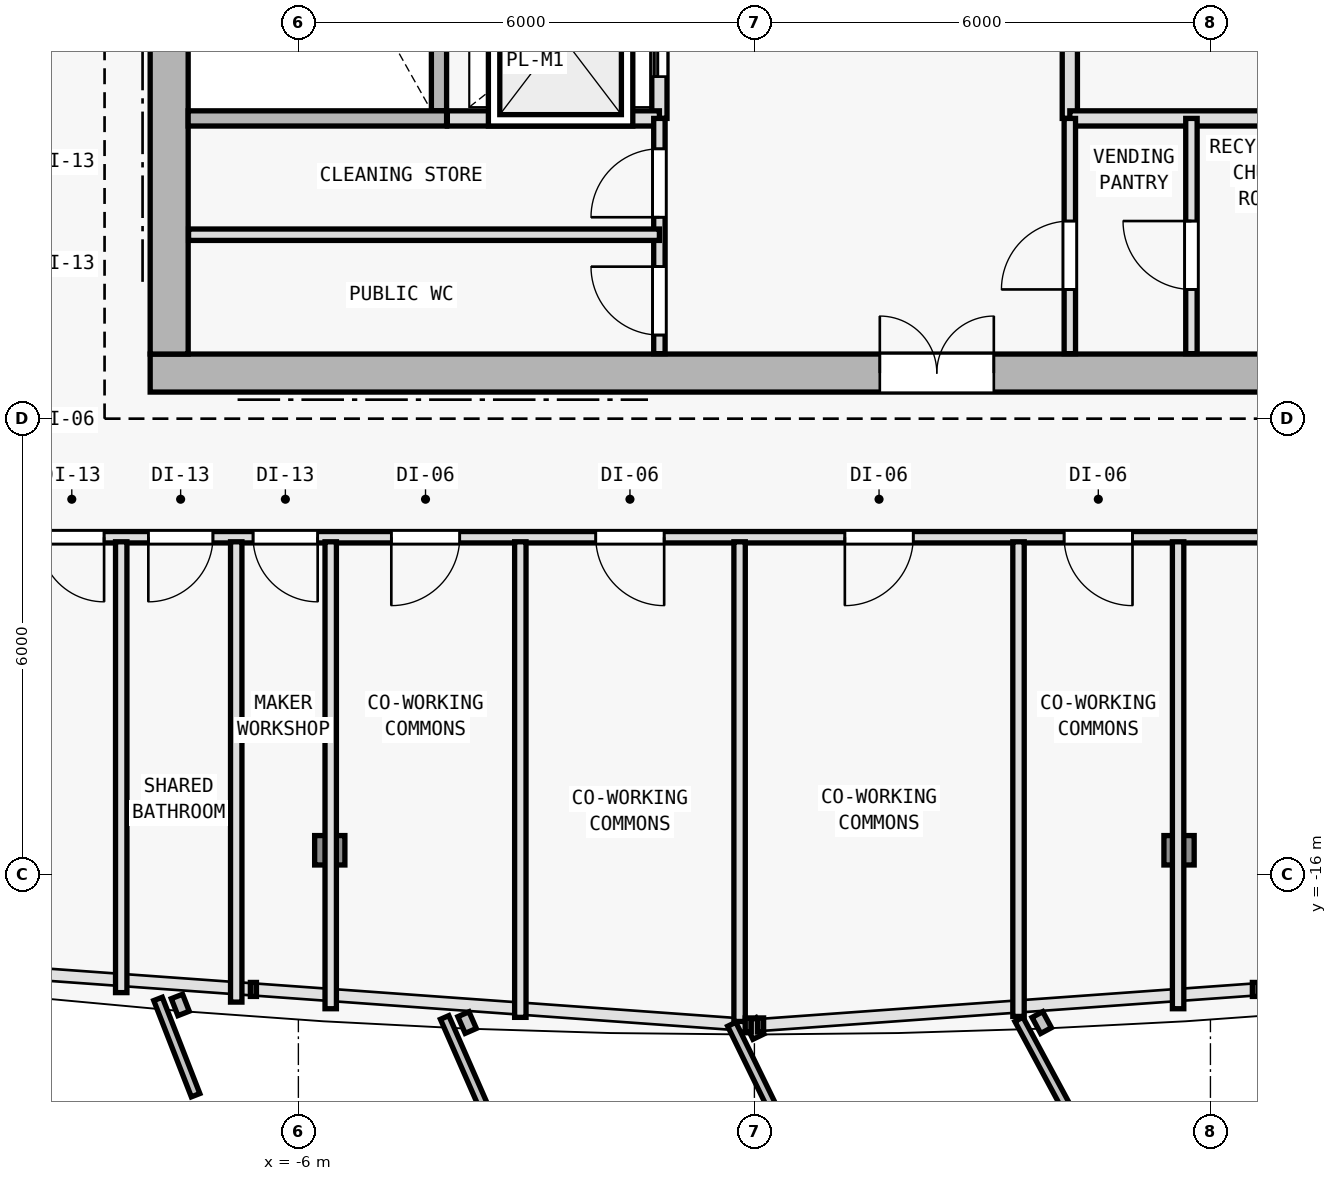
"""IFC4 building model, lengths in metres.
Left out: names, types, materials, properties, quantities, classifications, styles, units other than length and angle.
Written with IfcOpenShell. Run it as: python <this file> out.ifc"""

import sys

from ifc_helpers import new_model, si_unit, direction, frame, frame_2d, origin, origin_2d, place, context, subcontext, project, spatial, rectangle, i_section, extrude, element, fill, save


model = new_model("IFC4")
c1 = context("Model", 3, precision=1e-05, world=origin(), true_north=direction((0.0, 1.0)))
c2 = subcontext(c1, "Body", "Model", "MODEL_VIEW")
j1 = project(units=[si_unit("LENGTHUNIT", "METRE"), si_unit("PLANEANGLEUNIT", "RADIAN")], contexts=[c1])
p1 = place(None, origin())
s1 = spatial("IfcSite", under=j1, at=p1, CompositionType="ELEMENT")
p2 = place(p1, origin())
s2 = spatial("IfcBuilding", under=s1, at=p2, CompositionType="ELEMENT")
p3 = place(p2, frame((0.0, 0.0, 212.7)))
s3 = spatial("IfcBuildingStorey", under=s2, at=p3, CompositionType="ELEMENT", Elevation=212.7)
for number, where, z_axis, x_axis in (
    (1, (-7.7, -9.4, 0.0), (0.0, 0.0, 1.0), (1.0, 0.0, 0.0)),
    (2, (0.0, -9.4, 0.0), (0.0, 0.0, 1.0), (1.0, 0.0, 0.0)),
):
    element("IfcColumn", number, at=place(p3, frame(where, z_axis=z_axis, x_axis=x_axis)), inside=s3, PredefinedType="COLUMN", context=c2, shape_type="SweptSolid", body=[
        extrude(i_section(OverallWidth=0.398, OverallDepth=0.387, WebThickness=0.013, FlangeThickness=0.022, FilletRadius=0.015, at=origin_2d()), origin(), (0.0, 0.0, 1.0), 3.6),
    ])
for number, where, z_axis, x_axis in (
    (3, (-5.587, -15.678, 0.006), (0.007, 0.035, 0.999), (-0.982, 0.191, 0.0)),
    (4, (5.587, -15.678, 0.006), (-0.007, 0.035, 0.999), (-0.982, -0.191, 0.0)),
):
    element("IfcColumn", number, at=place(p3, frame(where, z_axis=z_axis, x_axis=x_axis)), inside=s3, PredefinedType="COLUMN", context=c2, shape_type="SweptSolid", body=[
        extrude(i_section(OverallWidth=0.398, OverallDepth=0.387, WebThickness=0.013, FlangeThickness=0.022, FilletRadius=0.015, at=origin_2d()), origin(), (0.0, 0.0, 1.0), 3.591),
    ])
p4 = place(p3, frame((-7.95, -9.4, 0.0), z_axis=(0.0, 0.0, 1.0), x_axis=(1.0, 0.0, 0.0)))
e5 = element("IfcWall", 5, at=p4, inside=s3, PredefinedType="SHEAR", context=c2, shape_type="SweptSolid", body=[
    extrude(rectangle(XDim=15.9, YDim=0.5, at=frame_2d((7.95, 0.0))), origin(), (0.0, 0.0, 1.0), 3.35),
])
p5 = place(p4, frame((9.6, 0.0, 0.0)))
e6 = element("IfcOpeningElement", 6, at=p5, cuts=e5, PredefinedType="OPENING", context=c2, shape_type="SweptSolid", body=[
    extrude(rectangle(XDim=1.5, YDim=2.2, at=frame_2d((0.75, 1.1))), frame((0.0, 0.26, 0.0), z_axis=(0.0, -1.0, 0.0), x_axis=(1.0, 0.0, 0.0)), (0.0, 0.0, 1.0), 0.52),
])
p6 = place(p3, frame((-7.7, -9.15, 0.0), z_axis=(0.0, 0.0, 1.0), x_axis=(0.0, 1.0, 0.0)))
e7 = element("IfcWall", 7, at=p6, inside=s3, PredefinedType="SHEAR", context=c2, shape_type="SweptSolid", body=[
    extrude(rectangle(XDim=19.1, YDim=0.5, at=frame_2d((9.55, 0.0))), origin(), (0.0, 0.0, 1.0), 3.35),
])
p7 = place(p6, frame((12.7, 0.0, 0.0)))
e8 = element("IfcOpeningElement", 8, at=p7, cuts=e7, PredefinedType="OPENING", context=c2, shape_type="SweptSolid", body=[
    extrude(rectangle(XDim=1.1, YDim=2.15, at=frame_2d((0.55, 1.075))), frame((0.0, 0.26, 0.0), z_axis=(0.0, -1.0, 0.0), x_axis=(1.0, 0.0, 0.0)), (0.0, 0.0, 1.0), 0.52),
])
p8 = place(p3, frame((-4.15, -5.95, 0.0), z_axis=(0.0, 0.0, 1.0), x_axis=(0.0, 1.0, 0.0)))
e9 = element("IfcWall", 9, at=p8, inside=s3, PredefinedType="SOLIDWALL", context=c2, shape_type="SweptSolid", body=[
    extrude(rectangle(XDim=7.2, YDim=0.2, at=frame_2d((3.6, 0.0))), origin(), (0.0, 0.0, 1.0), 3.35),
])
p9 = place(p3, frame((4.15, -6.05, 0.0), z_axis=(0.0, 0.0, 1.0), x_axis=(0.0, 1.0, 0.0)))
e10 = element("IfcWall", 10, at=p9, inside=s3, PredefinedType="SOLIDWALL", context=c2, shape_type="SweptSolid", body=[
    extrude(rectangle(XDim=8.7, YDim=0.2, at=frame_2d((4.35, 0.0))), origin(), (0.0, 0.0, 1.0), 3.35),
])
p10 = place(p9, frame((3.6, 0.0, 0.0)))
e11 = element("IfcOpeningElement", 11, at=p10, cuts=e10, PredefinedType="OPENING", context=c2, shape_type="SweptSolid", body=[
    extrude(rectangle(XDim=0.95, YDim=2.1, at=frame_2d((0.475, 1.05))), frame((0.0, 0.11, 0.0), z_axis=(0.0, -1.0, 0.0), x_axis=(1.0, 0.0, 0.0)), (0.0, 0.0, 1.0), 0.22),
])
p11 = place(p3, frame((-1.25, -6.05, 0.0), z_axis=(0.0, 0.0, 1.0), x_axis=(0.0, 1.0, 0.0)))
e12 = element("IfcWall", 12, at=p11, inside=s3, PredefinedType="SOLIDWALL", context=c2, shape_type="SweptSolid", body=[
    extrude(rectangle(XDim=8.7, YDim=0.2, at=frame_2d((4.35, 0.0))), origin(), (0.0, 0.0, 1.0), 3.35),
])
p12 = place(p11, frame((0.55, 0.0, 0.0)))
e13 = element("IfcOpeningElement", 13, at=p12, cuts=e12, PredefinedType="OPENING", context=c2, shape_type="SweptSolid", body=[
    extrude(rectangle(XDim=1.1, YDim=2.15, at=frame_2d((0.55, 1.075))), frame((0.0, 0.11, 0.0), z_axis=(0.0, -1.0, 0.0), x_axis=(1.0, 0.0, 0.0)), (0.0, 0.0, 1.0), 0.22),
])
p13 = place(p11, frame((2.65, 0.0, 0.0)))
e14 = element("IfcOpeningElement", 14, at=p13, cuts=e12, PredefinedType="OPENING", context=c2, shape_type="SweptSolid", body=[
    extrude(rectangle(XDim=1.1, YDim=2.15, at=frame_2d((0.55, 1.075))), frame((0.0, 0.11, 0.0), z_axis=(0.0, -1.0, 0.0), x_axis=(1.0, 0.0, 0.0)), (0.0, 0.0, 1.0), 0.22),
])
p14 = place(p11, frame((4.75, 0.0, 0.0)))
e15 = element("IfcOpeningElement", 15, at=p14, cuts=e12, PredefinedType="OPENING", context=c2, shape_type="SweptSolid", body=[
    extrude(rectangle(XDim=1.1, YDim=2.15, at=frame_2d((0.55, 1.075))), frame((0.0, 0.11, 0.0), z_axis=(0.0, -1.0, 0.0), x_axis=(1.0, 0.0, 0.0)), (0.0, 0.0, 1.0), 0.22),
])
p15 = place(p11, frame((6.85, 0.0, 0.0)))
e16 = element("IfcOpeningElement", 16, at=p15, cuts=e12, PredefinedType="OPENING", context=c2, shape_type="SweptSolid", body=[
    extrude(rectangle(XDim=1.1, YDim=2.15, at=frame_2d((0.55, 1.075))), frame((0.0, 0.11, 0.0), z_axis=(0.0, -1.0, 0.0), x_axis=(1.0, 0.0, 0.0)), (0.0, 0.0, 1.0), 0.22),
])
p16 = place(p3, frame((-7.45, -6.05, 0.0), z_axis=(0.0, 0.0, 1.0), x_axis=(1.0, 0.0, 0.0)))
e17 = element("IfcWall", 17, at=p16, inside=s3, PredefinedType="SOLIDWALL", context=c2, shape_type="SweptSolid", body=[
    extrude(rectangle(XDim=3.4, YDim=0.2, at=frame_2d((1.7, 0.0))), origin(), (0.0, 0.0, 1.0), 3.35),
])
p17 = place(p3, frame((-4.04, -6.05, 0.0), z_axis=(0.0, 0.0, 1.0), x_axis=(1.0, 0.0, 0.0)))
e18 = element("IfcWall", 18, at=p17, inside=s3, PredefinedType="SOLIDWALL", context=c2, shape_type="SweptSolid", body=[
    extrude(rectangle(XDim=2.79, YDim=0.2, at=frame_2d((1.395, 0.0))), origin(), (0.0, 0.0, 1.0), 3.35),
])
p18 = place(p3, frame((4.15, -6.05, 0.0), z_axis=(0.0, 0.0, 1.0), x_axis=(1.0, 0.0, 0.0)))
e19 = element("IfcWall", 19, at=p18, inside=s3, PredefinedType="SOLIDWALL", context=c2, shape_type="SweptSolid", body=[
    extrude(rectangle(XDim=3.295, YDim=0.2, at=frame_2d((1.647, 0.0))), origin(), (0.0, 0.0, 1.0), 3.35),
])
p19 = place(p3, frame((-1.25, -9.145, 0.0), z_axis=(0.0, 0.0, 1.0), x_axis=(0.0, 1.0, 0.0)))
e20 = element("IfcWall", 20, at=p19, inside=s3, PredefinedType="PARTITIONING", context=c2, shape_type="SweptSolid", body=[
    extrude(rectangle(XDim=3.095, YDim=0.15, at=frame_2d((1.547, 0.0))), origin(), (0.0, 0.0, 1.0), 3.35),
])
p20 = place(p19, frame((1.795, 0.0, 0.0)))
e21 = element("IfcOpeningElement", 21, at=p20, cuts=e20, PredefinedType="OPENING", context=c2, shape_type="SweptSolid", body=[
    extrude(rectangle(XDim=0.9, YDim=2.1, at=frame_2d((0.45, 1.05))), frame((0.0, 0.085, 0.0), z_axis=(0.0, -1.0, 0.0), x_axis=(1.0, 0.0, 0.0)), (0.0, 0.0, 1.0), 0.17),
])
p21 = place(p19, frame((0.245, 0.0, 0.0)))
e22 = element("IfcOpeningElement", 22, at=p21, cuts=e20, PredefinedType="OPENING", context=c2, shape_type="SweptSolid", body=[
    extrude(rectangle(XDim=0.9, YDim=2.1, at=frame_2d((0.45, 1.05))), frame((0.0, 0.085, 0.0), z_axis=(0.0, -1.0, 0.0), x_axis=(1.0, 0.0, 0.0)), (0.0, 0.0, 1.0), 0.17),
])
p22 = place(p3, frame((4.15, -9.145, 0.0), z_axis=(0.0, 0.0, 1.0), x_axis=(0.0, 1.0, 0.0)))
e23 = element("IfcWall", 23, at=p22, inside=s3, PredefinedType="PARTITIONING", context=c2, shape_type="SweptSolid", body=[
    extrude(rectangle(XDim=3.095, YDim=0.15, at=frame_2d((1.547, 0.0))), origin(), (0.0, 0.0, 1.0), 3.35),
])
p23 = place(p22, frame((0.845, 0.0, 0.0)))
e24 = element("IfcOpeningElement", 24, at=p23, cuts=e23, PredefinedType="OPENING", context=c2, shape_type="SweptSolid", body=[
    extrude(rectangle(XDim=0.9, YDim=2.1, at=frame_2d((0.45, 1.05))), frame((0.0, 0.085, 0.0), z_axis=(0.0, -1.0, 0.0), x_axis=(1.0, 0.0, 0.0)), (0.0, 0.0, 1.0), 0.17),
])
p24 = place(p3, frame((-7.445, -7.58, 0.0), z_axis=(0.0, 0.0, 1.0), x_axis=(1.0, 0.0, 0.0)))
e25 = element("IfcWall", 25, at=p24, inside=s3, PredefinedType="PARTITIONING", context=c2, shape_type="SweptSolid", body=[
    extrude(rectangle(XDim=6.195, YDim=0.15, at=frame_2d((3.098, 0.0))), origin(), (0.0, 0.0, 1.0), 3.35),
])
p25 = place(p3, frame((5.75, -9.145, 0.0), z_axis=(0.0, 0.0, 1.0), x_axis=(0.0, 1.0, 0.0)))
e26 = element("IfcWall", 26, at=p25, inside=s3, PredefinedType="PARTITIONING", context=c2, shape_type="SweptSolid", body=[
    extrude(rectangle(XDim=3.095, YDim=0.15, at=frame_2d((1.547, 0.0))), origin(), (0.0, 0.0, 1.0), 3.35),
])
p26 = place(p25, frame((0.845, 0.0, 0.0)))
e27 = element("IfcOpeningElement", 27, at=p26, cuts=e26, PredefinedType="OPENING", context=c2, shape_type="SweptSolid", body=[
    extrude(rectangle(XDim=0.9, YDim=2.1, at=frame_2d((0.45, 1.05))), frame((0.0, 0.085, 0.0), z_axis=(0.0, -1.0, 0.0), x_axis=(1.0, 0.0, 0.0)), (0.0, 0.0, 1.0), 0.17),
])
p27 = place(p3, frame((13.18, -11.56, 0.0), z_axis=(0.0, 0.0, 1.0), x_axis=(-1.0, 0.0, 0.0)))
e28 = element("IfcWall", 28, at=p27, inside=s3, PredefinedType="PARTITIONING", context=c2, shape_type="SweptSolid", body=[
    extrude(rectangle(XDim=23.04, YDim=0.15, at=frame_2d((11.52, 0.0))), origin(), (0.0, 0.0, 1.0), 2.825),
])
p28 = place(p27, frame((21.736, 0.0, 0.0)))
e29 = element("IfcOpeningElement", 29, at=p28, cuts=e28, PredefinedType="OPENING", context=c2, shape_type="SweptSolid", body=[
    extrude(rectangle(XDim=0.85, YDim=2.1, at=frame_2d((0.425, 1.05))), frame((0.0, 0.085, 0.0), z_axis=(0.0, -1.0, 0.0), x_axis=(1.0, 0.0, 0.0)), (0.0, 0.0, 1.0), 0.17),
])
p29 = place(p27, frame((20.304, 0.0, 0.0)))
e30 = element("IfcOpeningElement", 30, at=p29, cuts=e28, PredefinedType="OPENING", context=c2, shape_type="SweptSolid", body=[
    extrude(rectangle(XDim=0.85, YDim=2.1, at=frame_2d((0.425, 1.05))), frame((0.0, 0.085, 0.0), z_axis=(0.0, -1.0, 0.0), x_axis=(1.0, 0.0, 0.0)), (0.0, 0.0, 1.0), 0.17),
])
p30 = place(p27, frame((18.926, 0.0, 0.0)))
e31 = element("IfcOpeningElement", 31, at=p30, cuts=e28, PredefinedType="OPENING", context=c2, shape_type="SweptSolid", body=[
    extrude(rectangle(XDim=0.85, YDim=2.1, at=frame_2d((0.425, 1.05))), frame((0.0, 0.085, 0.0), z_axis=(0.0, -1.0, 0.0), x_axis=(1.0, 0.0, 0.0)), (0.0, 0.0, 1.0), 0.17),
])
p31 = place(p27, frame((17.057, 0.0, 0.0)))
e32 = element("IfcOpeningElement", 32, at=p31, cuts=e28, PredefinedType="OPENING", context=c2, shape_type="SweptSolid", body=[
    extrude(rectangle(XDim=0.9, YDim=2.1, at=frame_2d((0.45, 1.05))), frame((0.0, 0.085, 0.0), z_axis=(0.0, -1.0, 0.0), x_axis=(1.0, 0.0, 0.0)), (0.0, 0.0, 1.0), 0.17),
])
p32 = place(p27, frame((14.367, 0.0, 0.0)))
e33 = element("IfcOpeningElement", 33, at=p32, cuts=e28, PredefinedType="OPENING", context=c2, shape_type="SweptSolid", body=[
    extrude(rectangle(XDim=0.9, YDim=2.1, at=frame_2d((0.45, 1.05))), frame((0.0, 0.085, 0.0), z_axis=(0.0, -1.0, 0.0), x_axis=(1.0, 0.0, 0.0)), (0.0, 0.0, 1.0), 0.17),
])
p33 = place(p27, frame((11.09, 0.0, 0.0)))
e34 = element("IfcOpeningElement", 34, at=p33, cuts=e28, PredefinedType="OPENING", context=c2, shape_type="SweptSolid", body=[
    extrude(rectangle(XDim=0.9, YDim=2.1, at=frame_2d((0.45, 1.05))), frame((0.0, 0.085, 0.0), z_axis=(0.0, -1.0, 0.0), x_axis=(1.0, 0.0, 0.0)), (0.0, 0.0, 1.0), 0.17),
])
p34 = place(p27, frame((8.205, 0.0, 0.0)))
e35 = element("IfcOpeningElement", 35, at=p34, cuts=e28, PredefinedType="OPENING", context=c2, shape_type="SweptSolid", body=[
    extrude(rectangle(XDim=0.9, YDim=2.1, at=frame_2d((0.45, 1.05))), frame((0.0, 0.085, 0.0), z_axis=(0.0, -1.0, 0.0), x_axis=(1.0, 0.0, 0.0)), (0.0, 0.0, 1.0), 0.17),
])
p35 = place(p27, frame((3.442, 0.0, 0.0)))
e36 = element("IfcOpeningElement", 36, at=p35, cuts=e28, PredefinedType="OPENING", context=c2, shape_type="SweptSolid", body=[
    extrude(rectangle(XDim=0.9, YDim=2.1, at=frame_2d((0.45, 1.05))), frame((0.0, 0.085, 0.0), z_axis=(0.0, -1.0, 0.0), x_axis=(1.0, 0.0, 0.0)), (0.0, 0.0, 1.0), 0.17),
])
p36 = place(p3, frame((-5.575, -11.62, 0.0), z_axis=(0.0, 0.0, 1.0), x_axis=(0.0, -1.0, 0.0)))
e37 = element("IfcWall", 37, at=p36, inside=s3, PredefinedType="PARTITIONING", context=c2, shape_type="SweptSolid", body=[
    extrude(rectangle(XDim=6.143, YDim=0.15, at=frame_2d((3.071, 0.0))), origin(), (0.0, 0.0, 1.0), 2.875),
])
p37 = place(p3, frame((5.575, -11.62, 0.0), z_axis=(0.0, 0.0, 1.0), x_axis=(0.0, -1.0, 0.0)))
e38 = element("IfcWall", 38, at=p37, inside=s3, PredefinedType="PARTITIONING", context=c2, shape_type="SweptSolid", body=[
    extrude(rectangle(XDim=6.143, YDim=0.15, at=frame_2d((3.071, 0.0))), origin(), (0.0, 0.0, 1.0), 2.775),
])
p38 = place(p3, frame((-8.331, -11.62, 0.0), z_axis=(0.0, 0.0, 1.0), x_axis=(0.0, -1.0, 0.0)))
e39 = element("IfcWall", 39, at=p38, inside=s3, PredefinedType="PARTITIONING", context=c2, shape_type="SweptSolid", body=[
    extrude(rectangle(XDim=5.931, YDim=0.15, at=frame_2d((2.965, 0.0))), origin(), (0.0, 0.0, 1.0), 2.875),
])
p39 = place(p3, frame((-0.195, -11.62, 0.0), z_axis=(0.0, 0.0, 1.0), x_axis=(0.0, -1.0, 0.0)))
e40 = element("IfcWall", 40, at=p39, inside=s3, PredefinedType="PARTITIONING", context=c2, shape_type="SweptSolid", body=[
    extrude(rectangle(XDim=6.31, YDim=0.15, at=frame_2d((3.155, 0.0))), origin(), (0.0, 0.0, 1.0), 2.965),
])
p40 = place(p3, frame((-6.818, -11.62, 0.0), z_axis=(0.0, 0.0, 1.0), x_axis=(0.0, -1.0, 0.0)))
e41 = element("IfcWall", 41, at=p40, inside=s3, PredefinedType="PARTITIONING", context=c2, shape_type="SweptSolid", body=[
    extrude(rectangle(XDim=6.056, YDim=0.15, at=frame_2d((3.028, 0.0))), origin(), (0.0, 0.0, 1.0), 2.875),
])
p41 = place(p3, frame((-3.08, -11.62, 0.0), z_axis=(0.0, 0.0, 1.0), x_axis=(0.0, -1.0, 0.0)))
e42 = element("IfcWall", 42, at=p41, inside=s3, PredefinedType="PARTITIONING", context=c2, shape_type="SweptSolid", body=[
    extrude(rectangle(XDim=6.256, YDim=0.15, at=frame_2d((3.128, 0.0))), origin(), (0.0, 0.0, 1.0), 2.975),
])
p42 = place(p3, frame((3.475, -11.62, 0.0), z_axis=(0.0, 0.0, 1.0), x_axis=(0.0, -1.0, 0.0)))
e43 = element("IfcWall", 43, at=p42, inside=s3, PredefinedType="PARTITIONING", context=c2, shape_type="SweptSolid", body=[
    extrude(rectangle(XDim=6.244, YDim=0.15, at=frame_2d((3.122, 0.0))), origin(), (0.0, 0.0, 1.0), 2.975),
])
p43 = place(p5, origin())
e44 = element("IfcDoor", 44, at=p43, inside=s3, OperationType="DOUBLE_DOOR_SINGLE_SWING", PredefinedType="DOOR", context=c2, shape_type="SweptSolid", body=[
    extrude(rectangle(XDim=1.5, YDim=2.2, at=frame_2d((0.75, 1.1))), frame((0.0, 0.025, 0.0), z_axis=(0.0, -1.0, 0.0), x_axis=(1.0, 0.0, 0.0)), (0.0, 0.0, 1.0), 0.05),
])
fill(e6, e44)
p44 = place(p12, origin())
e45 = element("IfcDoor", 45, at=p44, inside=s3, OperationType="DOUBLE_DOOR_SLIDING", PredefinedType="DOOR", context=c2, shape_type="SweptSolid", body=[
    extrude(rectangle(XDim=1.1, YDim=2.15, at=frame_2d((0.55, 1.075))), frame((0.0, 0.025, 0.0), z_axis=(0.0, -1.0, 0.0), x_axis=(1.0, 0.0, 0.0)), (0.0, 0.0, 1.0), 0.05),
])
fill(e13, e45)
p45 = place(p20, origin())
e46 = element("IfcDoor", 46, at=p45, inside=s3, OperationType="SINGLE_SWING_LEFT", PredefinedType="DOOR", context=c2, shape_type="SweptSolid", body=[
    extrude(rectangle(XDim=0.9, YDim=2.1, at=frame_2d((0.45, 1.05))), frame((0.0, 0.025, 0.0), z_axis=(0.0, -1.0, 0.0), x_axis=(1.0, 0.0, 0.0)), (0.0, 0.0, 1.0), 0.05),
])
fill(e21, e46)
p46 = place(p21, origin())
e47 = element("IfcDoor", 47, at=p46, inside=s3, OperationType="SINGLE_SWING_RIGHT", PredefinedType="DOOR", context=c2, shape_type="SweptSolid", body=[
    extrude(rectangle(XDim=0.9, YDim=2.1, at=frame_2d((0.45, 1.05))), frame((0.0, 0.025, 0.0), z_axis=(0.0, -1.0, 0.0), x_axis=(1.0, 0.0, 0.0)), (0.0, 0.0, 1.0), 0.05),
])
fill(e22, e47)
p47 = place(p23, origin())
e48 = element("IfcDoor", 48, at=p47, inside=s3, OperationType="SINGLE_SWING_LEFT", PredefinedType="DOOR", context=c2, shape_type="SweptSolid", body=[
    extrude(rectangle(XDim=0.9, YDim=2.1, at=frame_2d((0.45, 1.05))), frame((0.0, 0.025, 0.0), z_axis=(0.0, -1.0, 0.0), x_axis=(1.0, 0.0, 0.0)), (0.0, 0.0, 1.0), 0.05),
])
fill(e24, e48)
p48 = place(p26, origin())
e49 = element("IfcDoor", 49, at=p48, inside=s3, OperationType="SINGLE_SWING_RIGHT", PredefinedType="DOOR", context=c2, shape_type="SweptSolid", body=[
    extrude(rectangle(XDim=0.9, YDim=2.1, at=frame_2d((0.45, 1.05))), frame((0.0, 0.025, 0.0), z_axis=(0.0, -1.0, 0.0), x_axis=(1.0, 0.0, 0.0)), (0.0, 0.0, 1.0), 0.05),
])
fill(e27, e49)
p49 = place(p28, origin())
e50 = element("IfcDoor", 50, at=p49, inside=s3, OperationType="SINGLE_SWING_LEFT", PredefinedType="DOOR", context=c2, shape_type="SweptSolid", body=[
    extrude(rectangle(XDim=0.85, YDim=2.1, at=frame_2d((0.425, 1.05))), frame((0.0, 0.025, 0.0), z_axis=(0.0, -1.0, 0.0), x_axis=(1.0, 0.0, 0.0)), (0.0, 0.0, 1.0), 0.05),
])
fill(e29, e50)
p50 = place(p29, origin())
e51 = element("IfcDoor", 51, at=p50, inside=s3, OperationType="SINGLE_SWING_RIGHT", PredefinedType="DOOR", context=c2, shape_type="SweptSolid", body=[
    extrude(rectangle(XDim=0.85, YDim=2.1, at=frame_2d((0.425, 1.05))), frame((0.0, 0.025, 0.0), z_axis=(0.0, -1.0, 0.0), x_axis=(1.0, 0.0, 0.0)), (0.0, 0.0, 1.0), 0.05),
])
fill(e30, e51)
p51 = place(p30, origin())
e52 = element("IfcDoor", 52, at=p51, inside=s3, OperationType="SINGLE_SWING_LEFT", PredefinedType="DOOR", context=c2, shape_type="SweptSolid", body=[
    extrude(rectangle(XDim=0.85, YDim=2.1, at=frame_2d((0.425, 1.05))), frame((0.0, 0.025, 0.0), z_axis=(0.0, -1.0, 0.0), x_axis=(1.0, 0.0, 0.0)), (0.0, 0.0, 1.0), 0.05),
])
fill(e31, e52)
p52 = place(p31, origin())
e53 = element("IfcDoor", 53, at=p52, inside=s3, OperationType="SINGLE_SWING_RIGHT", PredefinedType="DOOR", context=c2, shape_type="SweptSolid", body=[
    extrude(rectangle(XDim=0.9, YDim=2.1, at=frame_2d((0.45, 1.05))), frame((0.0, 0.025, 0.0), z_axis=(0.0, -1.0, 0.0), x_axis=(1.0, 0.0, 0.0)), (0.0, 0.0, 1.0), 0.05),
])
fill(e32, e53)
p53 = place(p32, origin())
e54 = element("IfcDoor", 54, at=p53, inside=s3, OperationType="SINGLE_SWING_LEFT", PredefinedType="DOOR", context=c2, shape_type="SweptSolid", body=[
    extrude(rectangle(XDim=0.9, YDim=2.1, at=frame_2d((0.45, 1.05))), frame((0.0, 0.025, 0.0), z_axis=(0.0, -1.0, 0.0), x_axis=(1.0, 0.0, 0.0)), (0.0, 0.0, 1.0), 0.05),
])
fill(e33, e54)
p54 = place(p33, origin())
e55 = element("IfcDoor", 55, at=p54, inside=s3, OperationType="SINGLE_SWING_RIGHT", PredefinedType="DOOR", context=c2, shape_type="SweptSolid", body=[
    extrude(rectangle(XDim=0.9, YDim=2.1, at=frame_2d((0.45, 1.05))), frame((0.0, 0.025, 0.0), z_axis=(0.0, -1.0, 0.0), x_axis=(1.0, 0.0, 0.0)), (0.0, 0.0, 1.0), 0.05),
])
fill(e34, e55)
p55 = place(p34, origin())
e56 = element("IfcDoor", 56, at=p55, inside=s3, OperationType="SINGLE_SWING_LEFT", PredefinedType="DOOR", context=c2, shape_type="SweptSolid", body=[
    extrude(rectangle(XDim=0.9, YDim=2.1, at=frame_2d((0.45, 1.05))), frame((0.0, 0.025, 0.0), z_axis=(0.0, -1.0, 0.0), x_axis=(1.0, 0.0, 0.0)), (0.0, 0.0, 1.0), 0.05),
])
fill(e35, e56)
save(model, sys.argv[1])
